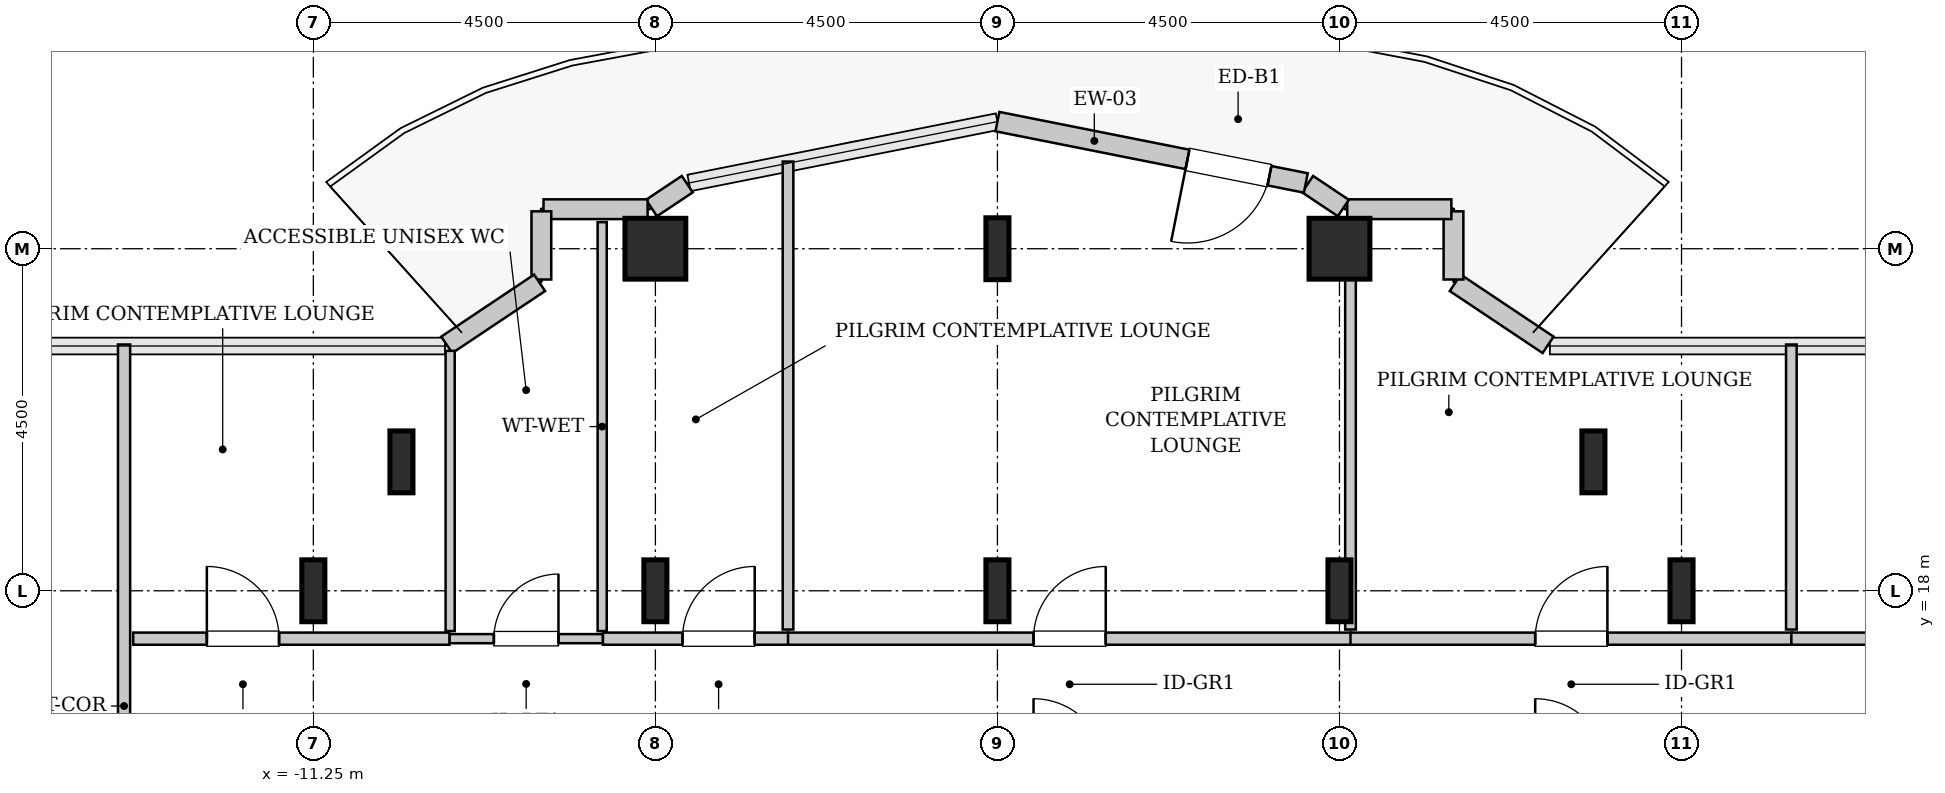
"""IFC4 building model, lengths in metres.
Left out: names, types, materials, properties, quantities, classifications, styles, units other than length and angle.
Written with IfcOpenShell. Run it as: python <this file> out.ifc"""

import sys

from ifc_helpers import new_model, si_unit, direction, frame, frame_2d, origin, origin_2d, place, context, subcontext, project, spatial, rectangle, hollow_rectangle, i_section, extrude, source, transform, mapped, element, fill, save


model = new_model("IFC4")
c1 = context("Model", 3, precision=1e-05, world=origin(), true_north=direction((0.0, 1.0)))
c2 = subcontext(c1, "Body", "Model", "MODEL_VIEW")
j1 = project(units=[si_unit("LENGTHUNIT", "METRE"), si_unit("PLANEANGLEUNIT", "RADIAN")], contexts=[c1])
p1 = place(None, origin())
s1 = spatial("IfcSite", under=j1, at=p1, CompositionType="ELEMENT")
p2 = place(p1, origin())
s2 = spatial("IfcBuilding", under=s1, at=p2, CompositionType="ELEMENT")
p3 = place(p2, frame((0.0, 0.0, 156.4)))
s3 = spatial("IfcBuildingStorey", under=s2, at=p3, CompositionType="ELEMENT", Elevation=156.4)
m1 = source(origin(), c2, "Body", "SweptSolid", [
    extrude(i_section(OverallWidth=0.303, OverallDepth=0.814, WebThickness=0.021, FlangeThickness=0.04, FilletRadius=0.03, at=origin_2d()), origin(), (0.0, 0.0, 1.0), 3.8),
])
for number, where, z_axis, x_axis in (
    (1, (-11.25, 18.0, 0.0), (0.0, 0.0, 1.0), (1.0, 0.0, 0.0)),
    (2, (-10.091, 19.696, 0.0), (0.0, 0.0, 1.0), (1.0, 0.0, 0.0)),
    (3, (-6.75, 18.0, 0.0), (0.0, 0.0, 1.0), (1.0, 0.0, 0.0)),
):
    element("IfcColumn", number, at=place(p3, frame(where, z_axis=z_axis, x_axis=x_axis)), inside=s3, PredefinedType="COLUMN", context=c2, shape_type="MappedRepresentation", body=[
        mapped(m1, transform((0.0, 0.0, 0.0), x_axis=(1.0, 0.0, 0.0), y_axis=(0.0, 1.0, 0.0), z_axis=(0.0, 0.0, 1.0), scale=1.0)),
    ])
m2 = source(origin(), c2, "Body", "SweptSolid", [
    extrude(hollow_rectangle(XDim=0.8, YDim=0.8, WallThickness=0.04, InnerFilletRadius=0.04, OuterFilletRadius=0.08, at=origin_2d()), origin(), (0.0, 0.0, 1.0), 3.8),
])
p4 = place(p3, frame((-6.75, 22.5, 0.0), z_axis=(0.0, 0.0, 1.0), x_axis=(1.0, 0.0, 0.0)))
e4 = element("IfcColumn", 4, at=p4, inside=s3, PredefinedType="COLUMN", context=c2, shape_type="MappedRepresentation", body=[
    mapped(m2, transform((0.0, 0.0, 0.0), x_axis=(1.0, 0.0, 0.0), y_axis=(0.0, 1.0, 0.0), z_axis=(0.0, 0.0, 1.0), scale=1.0)),
])
for number, where, z_axis, x_axis in (
    (5, (-2.25, 18.0, 0.0), (0.0, 0.0, 1.0), (1.0, 0.0, 0.0)),
    (6, (-2.25, 22.5, 0.0), (0.0, 0.0, 1.0), (1.0, 0.0, 0.0)),
    (7, (2.25, 18.0, 0.0), (0.0, 0.0, 1.0), (1.0, 0.0, 0.0)),
):
    element("IfcColumn", number, at=place(p3, frame(where, z_axis=z_axis, x_axis=x_axis)), inside=s3, PredefinedType="COLUMN", context=c2, shape_type="MappedRepresentation", body=[
        mapped(m1, transform((0.0, 0.0, 0.0), x_axis=(1.0, 0.0, 0.0), y_axis=(0.0, 1.0, 0.0), z_axis=(0.0, 0.0, 1.0), scale=1.0)),
    ])
p5 = place(p3, frame((2.25, 22.5, 0.0), z_axis=(0.0, 0.0, 1.0), x_axis=(1.0, 0.0, 0.0)))
e8 = element("IfcColumn", 8, at=p5, inside=s3, PredefinedType="COLUMN", context=c2, shape_type="MappedRepresentation", body=[
    mapped(m2, transform((0.0, 0.0, 0.0), x_axis=(1.0, 0.0, 0.0), y_axis=(0.0, 1.0, 0.0), z_axis=(0.0, 0.0, 1.0), scale=1.0)),
])
for number, where, z_axis, x_axis in (
    (9, (5.591, 19.696, 0.0), (0.0, 0.0, 1.0), (1.0, 0.0, 0.0)),
    (10, (6.75, 18.0, 0.0), (0.0, 0.0, 1.0), (1.0, 0.0, 0.0)),
):
    element("IfcColumn", number, at=place(p3, frame(where, z_axis=z_axis, x_axis=x_axis)), inside=s3, PredefinedType="COLUMN", context=c2, shape_type="MappedRepresentation", body=[
        mapped(m1, transform((0.0, 0.0, 0.0), x_axis=(1.0, 0.0, 0.0), y_axis=(0.0, 1.0, 0.0), z_axis=(0.0, 0.0, 1.0), scale=1.0)),
    ])
m3 = source(origin(), c2, "Body", "SweptSolid", [
    extrude(rectangle(XDim=1.469, YDim=0.26, at=frame_2d((0.734, 0.0))), origin(), (0.0, 0.0, 1.0), 3.55),
])
p6 = place(p3, frame((4.995, 21.236, 0.0), z_axis=(0.0, 0.0, 1.0), x_axis=(-0.831461760506, 0.555581983884, 0.0)))
e11 = element("IfcWall", 11, at=p6, inside=s3, PredefinedType="SOLIDWALL", context=c2, shape_type="MappedRepresentation", body=[
    mapped(m3, transform((0.0, 0.0, 0.0), x_axis=(1.0, 0.0, 0.0), y_axis=(0.0, 1.0, 0.0), z_axis=(0.0, 0.0, 1.0), scale=1.0)),
])
m4 = source(origin(), c2, "Body", "SweptSolid", [
    extrude(rectangle(XDim=0.897, YDim=0.26, at=frame_2d((0.448, 0.0))), origin(), (0.0, 0.0, 1.0), 3.55),
])
p7 = place(p3, frame((3.75, 22.095, 0.0), z_axis=(0.0, 0.0, 1.0), x_axis=(0.0, 1.0, 0.0)))
e12 = element("IfcWall", 12, at=p7, inside=s3, PredefinedType="SOLIDWALL", context=c2, shape_type="MappedRepresentation", body=[
    mapped(m4, transform((0.0, 0.0, 0.0), x_axis=(1.0, 0.0, 0.0), y_axis=(0.0, 1.0, 0.0), z_axis=(0.0, 0.0, 1.0), scale=1.0)),
])
m5 = source(origin(), c2, "Body", "SweptSolid", [
    extrude(rectangle(XDim=1.37, YDim=0.26, at=frame_2d((0.685, 0.0))), origin(), (0.0, 0.0, 1.0), 3.55),
])
p8 = place(p3, frame((3.722, 23.02, 0.0), z_axis=(0.0, 0.0, 1.0), x_axis=(-1.0, 0.0, 0.0)))
e13 = element("IfcWall", 13, at=p8, inside=s3, PredefinedType="SOLIDWALL", context=c2, shape_type="MappedRepresentation", body=[
    mapped(m5, transform((0.0, 0.0, 0.0), x_axis=(1.0, 0.0, 0.0), y_axis=(0.0, 1.0, 0.0), z_axis=(0.0, 0.0, 1.0), scale=1.0)),
])
m6 = source(origin(), c2, "Body", "SweptSolid", [
    extrude(rectangle(XDim=0.565, YDim=0.26, at=frame_2d((0.283, 0.0))), origin(), (0.0, 0.0, 1.0), 3.55),
])
p9 = place(p3, frame((2.301, 23.036, 0.0), z_axis=(0.0, 0.0, 1.0), x_axis=(-0.831651492666, 0.555297933317, 0.0)))
e14 = element("IfcWall", 14, at=p9, inside=s3, PredefinedType="SOLIDWALL", context=c2, shape_type="MappedRepresentation", body=[
    mapped(m6, transform((0.0, 0.0, 0.0), x_axis=(1.0, 0.0, 0.0), y_axis=(0.0, 1.0, 0.0), z_axis=(0.0, 0.0, 1.0), scale=1.0)),
])
m7 = source(origin(), c2, "Body", "SweptSolid", [
    extrude(rectangle(XDim=4.137, YDim=0.26, at=frame_2d((2.068, 0.0))), origin(), (0.0, 0.0, 1.0), 3.55),
])
p10 = place(p3, frame((1.807, 23.365, 0.0), z_axis=(0.0, 0.0, 1.0), x_axis=(-0.980782170794, 0.195105954428, 0.0)))
e15 = element("IfcWall", 15, at=p10, inside=s3, PredefinedType="SOLIDWALL", context=c2, shape_type="MappedRepresentation", body=[
    mapped(m7, transform((0.0, 0.0, 0.0), x_axis=(1.0, 0.0, 0.0), y_axis=(0.0, 1.0, 0.0), z_axis=(0.0, 0.0, 1.0), scale=1.0)),
])
p11 = place(p10, frame((0.488, 0.0, 0.0)))
e16 = element("IfcOpeningElement", 16, at=p11, cuts=e15, PredefinedType="OPENING", context=c2, shape_type="SweptSolid", body=[
    extrude(rectangle(XDim=1.1, YDim=2.2, at=frame_2d((0.55, 1.1))), frame((0.0, 0.14, 0.0), z_axis=(0.0, -1.0, 0.0), x_axis=(1.0, 0.0, 0.0)), (0.0, 0.0, 1.0), 0.28),
])
p12 = place(p3, frame((-6.331, 23.35, 0.0), z_axis=(0.0, 0.0, 1.0), x_axis=(-0.831651492666, -0.555297933317, 0.0)))
e17 = element("IfcWall", 17, at=p12, inside=s3, PredefinedType="SOLIDWALL", context=c2, shape_type="MappedRepresentation", body=[
    mapped(m6, transform((0.0, 0.0, 0.0), x_axis=(1.0, 0.0, 0.0), y_axis=(0.0, 1.0, 0.0), z_axis=(0.0, 0.0, 1.0), scale=1.0)),
])
p13 = place(p3, frame((-6.852, 23.02, 0.0), z_axis=(0.0, 0.0, 1.0), x_axis=(-1.0, 0.0, 0.0)))
e18 = element("IfcWall", 18, at=p13, inside=s3, PredefinedType="SOLIDWALL", context=c2, shape_type="MappedRepresentation", body=[
    mapped(m5, transform((0.0, 0.0, 0.0), x_axis=(1.0, 0.0, 0.0), y_axis=(0.0, 1.0, 0.0), z_axis=(0.0, 0.0, 1.0), scale=1.0)),
])
p14 = place(p3, frame((-8.25, 22.992, 0.0), z_axis=(0.0, 0.0, 1.0), x_axis=(0.0, -1.0, 0.0)))
e19 = element("IfcWall", 19, at=p14, inside=s3, PredefinedType="SOLIDWALL", context=c2, shape_type="MappedRepresentation", body=[
    mapped(m4, transform((0.0, 0.0, 0.0), x_axis=(1.0, 0.0, 0.0), y_axis=(0.0, 1.0, 0.0), z_axis=(0.0, 0.0, 1.0), scale=1.0)),
])
p15 = place(p3, frame((-8.273, 22.052, 0.0), z_axis=(0.0, 0.0, 1.0), x_axis=(-0.831461760506, -0.555581983884, 0.0)))
e20 = element("IfcWall", 20, at=p15, inside=s3, PredefinedType="SOLIDWALL", context=c2, shape_type="MappedRepresentation", body=[
    mapped(m3, transform((0.0, 0.0, 0.0), x_axis=(1.0, 0.0, 0.0), y_axis=(0.0, 1.0, 0.0), z_axis=(0.0, 0.0, 1.0), scale=1.0)),
])
m8 = source(origin(), c2, "Body", "SweptSolid", [
    extrude(rectangle(XDim=2.02, YDim=0.12, at=frame_2d((1.01, 0.0))), origin(), (0.0, 0.0, 1.0), 3.535),
])
p16 = place(p3, frame((-9.46, 17.37, 0.0), z_axis=(0.0, 0.0, 1.0), x_axis=(1.0, 0.0, 0.0)))
e21 = element("IfcWall", 21, at=p16, inside=s3, PredefinedType="PLUMBINGWALL", context=c2, shape_type="MappedRepresentation", body=[
    mapped(m8, transform((0.0, 0.0, 0.0), x_axis=(1.0, 0.0, 0.0), y_axis=(0.0, 1.0, 0.0), z_axis=(0.0, 0.0, 1.0), scale=1.0)),
])
p17 = place(p16, frame((0.585, 0.0, 0.0)))
e22 = element("IfcOpeningElement", 22, at=p17, cuts=e21, PredefinedType="OPENING", context=c2, shape_type="SweptSolid", body=[
    extrude(rectangle(XDim=0.85, YDim=2.1, at=frame_2d((0.425, 1.05))), frame((0.0, 0.07, 0.0), z_axis=(0.0, -1.0, 0.0), x_axis=(1.0, 0.0, 0.0)), (0.0, 0.0, 1.0), 0.14),
])
m9 = source(origin(), c2, "Body", "SweptSolid", [
    extrude(rectangle(XDim=5.38, YDim=0.12, at=frame_2d((2.69, 0.0))), origin(), (0.0, 0.0, 1.0), 3.535),
])
p18 = place(p3, frame((-7.45, 17.47, 0.0), z_axis=(0.0, 0.0, 1.0), x_axis=(0.0, 1.0, 0.0)))
e23 = element("IfcWall", 23, at=p18, inside=s3, PredefinedType="PLUMBINGWALL", context=c2, shape_type="MappedRepresentation", body=[
    mapped(m9, transform((0.0, 0.0, 0.0), x_axis=(1.0, 0.0, 0.0), y_axis=(0.0, 1.0, 0.0), z_axis=(0.0, 0.0, 1.0), scale=1.0)),
])
m10 = source(origin(), c2, "Body", "SweptSolid", [
    extrude(rectangle(XDim=3.687, YDim=0.12, at=frame_2d((1.843, 0.0))), origin(), (0.0, 0.0, 1.0), 3.535),
])
p19 = place(p3, frame((-9.45, 17.47, 0.0), z_axis=(0.0, 0.0, 1.0), x_axis=(0.0, 1.0, 0.0)))
e24 = element("IfcWall", 24, at=p19, inside=s3, PredefinedType="PLUMBINGWALL", context=c2, shape_type="MappedRepresentation", body=[
    mapped(m10, transform((0.0, 0.0, 0.0), x_axis=(1.0, 0.0, 0.0), y_axis=(0.0, 1.0, 0.0), z_axis=(0.0, 0.0, 1.0), scale=1.0)),
])
m11 = source(origin(), c2, "Body", "SweptSolid", [
    extrude(rectangle(XDim=16.045, YDim=0.16, at=frame_2d((8.022, 0.0))), origin(), (0.0, 0.0, 1.0), 3.535),
])
p20 = place(p3, frame((-13.74, 5.195, 0.0), z_axis=(0.0, 0.0, 1.0), x_axis=(0.0, 1.0, 0.0)))
e25 = element("IfcWall", 25, at=p20, inside=s3, PredefinedType="PARTITIONING", context=c2, shape_type="MappedRepresentation", body=[
    mapped(m11, transform((0.0, 0.0, 0.0), x_axis=(1.0, 0.0, 0.0), y_axis=(0.0, 1.0, 0.0), z_axis=(0.0, 0.0, 1.0), scale=1.0)),
])
p21 = place(p20, frame((5.633, 0.0, 0.0)))
e26 = element("IfcOpeningElement", 26, at=p21, cuts=e25, PredefinedType="OPENING", context=c2, shape_type="SweptSolid", body=[
    extrude(rectangle(XDim=0.95, YDim=2.1, at=frame_2d((0.475, 1.05))), frame((0.0, 0.09, 0.0), z_axis=(0.0, -1.0, 0.0), x_axis=(1.0, 0.0, 0.0)), (0.0, 0.0, 1.0), 0.18),
])
m12 = source(origin(), c2, "Body", "SweptSolid", [
    extrude(rectangle(XDim=2.445, YDim=0.16, at=frame_2d((1.222, 0.0))), origin(), (0.0, 0.0, 1.0), 3.535),
])
p22 = place(p3, frame((-7.44, 17.37, 0.0), z_axis=(0.0, 0.0, 1.0), x_axis=(1.0, 0.0, 0.0)))
e27 = element("IfcWall", 27, at=p22, inside=s3, PredefinedType="PARTITIONING", context=c2, shape_type="MappedRepresentation", body=[
    mapped(m12, transform((0.0, 0.0, 0.0), x_axis=(1.0, 0.0, 0.0), y_axis=(0.0, 1.0, 0.0), z_axis=(0.0, 0.0, 1.0), scale=1.0)),
])
p23 = place(p22, frame((1.047, 0.0, 0.0)))
e28 = element("IfcOpeningElement", 28, at=p23, cuts=e27, PredefinedType="OPENING", context=c2, shape_type="SweptSolid", body=[
    extrude(rectangle(XDim=0.95, YDim=2.1, at=frame_2d((0.475, 1.05))), frame((0.0, 0.09, 0.0), z_axis=(0.0, -1.0, 0.0), x_axis=(1.0, 0.0, 0.0)), (0.0, 0.0, 1.0), 0.18),
])
m13 = source(origin(), c2, "Body", "SweptSolid", [
    extrude(rectangle(XDim=6.157, YDim=0.14, at=frame_2d((3.078, 0.0))), origin(), (0.0, 0.0, 1.0), 3.535),
])
p24 = place(p3, frame((-5.005, 17.49, 0.0), z_axis=(0.0, 0.0, 1.0), x_axis=(0.0, 1.0, 0.0)))
e29 = element("IfcWall", 29, at=p24, inside=s3, PredefinedType="PARTITIONING", context=c2, shape_type="MappedRepresentation", body=[
    mapped(m13, transform((0.0, 0.0, 0.0), x_axis=(1.0, 0.0, 0.0), y_axis=(0.0, 1.0, 0.0), z_axis=(0.0, 0.0, 1.0), scale=1.0)),
])
m14 = source(origin(), c2, "Body", "SweptSolid", [
    extrude(rectangle(XDim=4.16, YDim=0.16, at=frame_2d((2.08, 0.0))), origin(), (0.0, 0.0, 1.0), 3.535),
])
p25 = place(p3, frame((-13.62, 17.37, 0.0), z_axis=(0.0, 0.0, 1.0), x_axis=(1.0, 0.0, 0.0)))
e30 = element("IfcWall", 30, at=p25, inside=s3, PredefinedType="PARTITIONING", context=c2, shape_type="MappedRepresentation", body=[
    mapped(m14, transform((0.0, 0.0, 0.0), x_axis=(1.0, 0.0, 0.0), y_axis=(0.0, 1.0, 0.0), z_axis=(0.0, 0.0, 1.0), scale=1.0)),
])
p26 = place(p25, frame((0.969, 0.0, 0.0)))
e31 = element("IfcOpeningElement", 31, at=p26, cuts=e30, PredefinedType="OPENING", context=c2, shape_type="SweptSolid", body=[
    extrude(rectangle(XDim=0.95, YDim=2.1, at=frame_2d((0.475, 1.05))), frame((0.0, 0.09, 0.0), z_axis=(0.0, -1.0, 0.0), x_axis=(1.0, 0.0, 0.0)), (0.0, 0.0, 1.0), 0.18),
])
m15 = source(origin(), c2, "Body", "SweptSolid", [
    extrude(rectangle(XDim=7.41, YDim=0.16, at=frame_2d((3.705, 0.0))), origin(), (0.0, 0.0, 1.0), 3.535),
])
p27 = place(p3, frame((-5.005, 17.37, 0.0), z_axis=(0.0, 0.0, 1.0), x_axis=(1.0, 0.0, 0.0)))
e32 = element("IfcWall", 32, at=p27, inside=s3, PredefinedType="PARTITIONING", context=c2, shape_type="MappedRepresentation", body=[
    mapped(m15, transform((0.0, 0.0, 0.0), x_axis=(1.0, 0.0, 0.0), y_axis=(0.0, 1.0, 0.0), z_axis=(0.0, 0.0, 1.0), scale=1.0)),
])
p28 = place(p27, frame((3.23, 0.0, 0.0)))
e33 = element("IfcOpeningElement", 33, at=p28, cuts=e32, PredefinedType="OPENING", context=c2, shape_type="SweptSolid", body=[
    extrude(rectangle(XDim=0.95, YDim=2.1, at=frame_2d((0.475, 1.05))), frame((0.0, 0.09, 0.0), z_axis=(0.0, -1.0, 0.0), x_axis=(1.0, 0.0, 0.0)), (0.0, 0.0, 1.0), 0.18),
])
m16 = source(origin(), c2, "Body", "SweptSolid", [
    extrude(rectangle(XDim=5.36, YDim=0.14, at=frame_2d((2.68, 0.0))), origin(), (0.0, 0.0, 1.0), 2.875),
])
p29 = place(p3, frame((2.395, 17.49, 0.0), z_axis=(0.0, 0.0, 1.0), x_axis=(0.0, 1.0, 0.0)))
e34 = element("IfcWall", 34, at=p29, inside=s3, PredefinedType="PARTITIONING", context=c2, shape_type="MappedRepresentation", body=[
    mapped(m16, transform((0.0, 0.0, 0.0), x_axis=(1.0, 0.0, 0.0), y_axis=(0.0, 1.0, 0.0), z_axis=(0.0, 0.0, 1.0), scale=1.0)),
])
m17 = source(origin(), c2, "Body", "SweptSolid", [
    extrude(rectangle(XDim=5.81, YDim=0.16, at=frame_2d((2.905, 0.0))), origin(), (0.0, 0.0, 1.0), 3.535),
])
p30 = place(p3, frame((2.395, 17.37, 0.0), z_axis=(0.0, 0.0, 1.0), x_axis=(1.0, 0.0, 0.0)))
e35 = element("IfcWall", 35, at=p30, inside=s3, PredefinedType="PARTITIONING", context=c2, shape_type="MappedRepresentation", body=[
    mapped(m17, transform((0.0, 0.0, 0.0), x_axis=(1.0, 0.0, 0.0), y_axis=(0.0, 1.0, 0.0), z_axis=(0.0, 0.0, 1.0), scale=1.0)),
])
p31 = place(p30, frame((2.43, 0.0, 0.0)))
e36 = element("IfcOpeningElement", 36, at=p31, cuts=e35, PredefinedType="OPENING", context=c2, shape_type="SweptSolid", body=[
    extrude(rectangle(XDim=0.95, YDim=2.1, at=frame_2d((0.475, 1.05))), frame((0.0, 0.09, 0.0), z_axis=(0.0, -1.0, 0.0), x_axis=(1.0, 0.0, 0.0)), (0.0, 0.0, 1.0), 0.18),
])
m18 = source(origin(), c2, "Body", "SweptSolid", [
    extrude(rectangle(XDim=3.75, YDim=0.14, at=frame_2d((1.875, 0.0))), origin(), (0.0, 0.0, 1.0), 3.535),
])
p32 = place(p3, frame((8.195, 17.49, 0.0), z_axis=(0.0, 0.0, 1.0), x_axis=(0.0, 1.0, 0.0)))
e37 = element("IfcWall", 37, at=p32, inside=s3, PredefinedType="PARTITIONING", context=c2, shape_type="MappedRepresentation", body=[
    mapped(m18, transform((0.0, 0.0, 0.0), x_axis=(1.0, 0.0, 0.0), y_axis=(0.0, 1.0, 0.0), z_axis=(0.0, 0.0, 1.0), scale=1.0)),
])
m19 = source(origin(), c2, "Body", "SweptSolid", [
    extrude(rectangle(XDim=5.425, YDim=0.16, at=frame_2d((2.712, 0.0))), origin(), (0.0, 0.0, 1.0), 3.535),
])
p33 = place(p3, frame((8.195, 17.37, 0.0), z_axis=(0.0, 0.0, 1.0), x_axis=(1.0, 0.0, 0.0)))
e38 = element("IfcWall", 38, at=p33, inside=s3, PredefinedType="PARTITIONING", context=c2, shape_type="MappedRepresentation", body=[
    mapped(m19, transform((0.0, 0.0, 0.0), x_axis=(1.0, 0.0, 0.0), y_axis=(0.0, 1.0, 0.0), z_axis=(0.0, 0.0, 1.0), scale=1.0)),
])
p34 = place(p33, frame((1.611, 0.0, 0.0)))
e39 = element("IfcOpeningElement", 39, at=p34, cuts=e38, PredefinedType="OPENING", context=c2, shape_type="SweptSolid", body=[
    extrude(rectangle(XDim=0.95, YDim=2.1, at=frame_2d((0.475, 1.05))), frame((0.0, 0.09, 0.0), z_axis=(0.0, -1.0, 0.0), x_axis=(1.0, 0.0, 0.0)), (0.0, 0.0, 1.0), 0.18),
])
m20 = source(origin(), c2, "Body", "SweptSolid", [
    extrude(rectangle(XDim=1.1, YDim=2.2, at=frame_2d((0.55, 1.1))), frame((0.0, 0.025, 0.0), z_axis=(0.0, -1.0, 0.0), x_axis=(1.0, 0.0, 0.0)), (0.0, 0.0, 1.0), 0.05),
])
p35 = place(p11, origin())
e40 = element("IfcDoor", 40, at=p35, inside=s3, OperationType="SINGLE_SWING_RIGHT", PredefinedType="DOOR", context=c2, shape_type="MappedRepresentation", body=[
    mapped(m20, transform((0.0, 0.0, 0.0), x_axis=(1.0, 0.0, 0.0), y_axis=(0.0, 1.0, 0.0), z_axis=(0.0, 0.0, 1.0), scale=1.0)),
])
fill(e16, e40)
m21 = source(origin(), c2, "Body", "SweptSolid", [
    extrude(rectangle(XDim=0.85, YDim=2.1, at=frame_2d((0.425, 1.05))), frame((0.0, 0.025, 0.0), z_axis=(0.0, -1.0, 0.0), x_axis=(1.0, 0.0, 0.0)), (0.0, 0.0, 1.0), 0.05),
])
p36 = place(p17, origin())
e41 = element("IfcDoor", 41, at=p36, inside=s3, OperationType="SINGLE_SWING_RIGHT", PredefinedType="DOOR", context=c2, shape_type="MappedRepresentation", body=[
    mapped(m21, transform((0.0, 0.0, 0.0), x_axis=(1.0, 0.0, 0.0), y_axis=(0.0, 1.0, 0.0), z_axis=(0.0, 0.0, 1.0), scale=1.0)),
])
fill(e22, e41)
m22 = source(origin(), c2, "Body", "SweptSolid", [
    extrude(rectangle(XDim=0.95, YDim=2.1, at=frame_2d((0.475, 1.05))), frame((0.0, 0.025, 0.0), z_axis=(0.0, -1.0, 0.0), x_axis=(1.0, 0.0, 0.0)), (0.0, 0.0, 1.0), 0.05),
])
p37 = place(p23, origin())
e42 = element("IfcDoor", 42, at=p37, inside=s3, OperationType="SINGLE_SWING_RIGHT", PredefinedType="DOOR", context=c2, shape_type="MappedRepresentation", body=[
    mapped(m22, transform((0.0, 0.0, 0.0), x_axis=(1.0, 0.0, 0.0), y_axis=(0.0, 1.0, 0.0), z_axis=(0.0, 0.0, 1.0), scale=1.0)),
])
fill(e28, e42)
p38 = place(p26, origin())
e43 = element("IfcDoor", 43, at=p38, inside=s3, OperationType="SINGLE_SWING_LEFT", PredefinedType="DOOR", context=c2, shape_type="MappedRepresentation", body=[
    mapped(m22, transform((0.0, 0.0, 0.0), x_axis=(1.0, 0.0, 0.0), y_axis=(0.0, 1.0, 0.0), z_axis=(0.0, 0.0, 1.0), scale=1.0)),
])
fill(e31, e43)
p39 = place(p28, origin())
e44 = element("IfcDoor", 44, at=p39, inside=s3, OperationType="SINGLE_SWING_RIGHT", PredefinedType="DOOR", context=c2, shape_type="MappedRepresentation", body=[
    mapped(m22, transform((0.0, 0.0, 0.0), x_axis=(1.0, 0.0, 0.0), y_axis=(0.0, 1.0, 0.0), z_axis=(0.0, 0.0, 1.0), scale=1.0)),
])
fill(e33, e44)
p40 = place(p31, origin())
e45 = element("IfcDoor", 45, at=p40, inside=s3, OperationType="SINGLE_SWING_RIGHT", PredefinedType="DOOR", context=c2, shape_type="MappedRepresentation", body=[
    mapped(m22, transform((0.0, 0.0, 0.0), x_axis=(1.0, 0.0, 0.0), y_axis=(0.0, 1.0, 0.0), z_axis=(0.0, 0.0, 1.0), scale=1.0)),
])
fill(e36, e45)
save(model, sys.argv[1])
